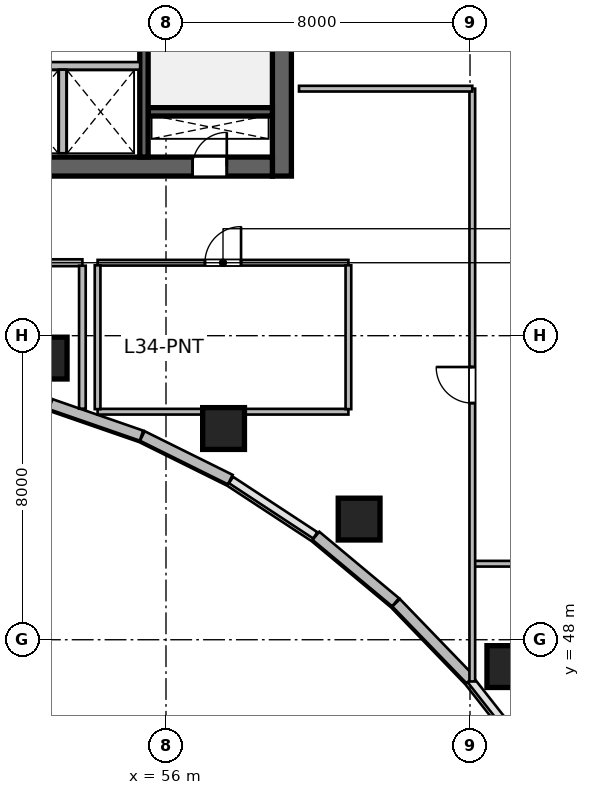
"""IFC4 building model, lengths in metres.
Left out: names, types, materials, properties, quantities, classifications, styles, units other than length and angle.
Written with IfcOpenShell. Run it as: python <this file> out.ifc"""

import sys

from ifc_helpers import new_model, si_unit, direction, frame, frame_2d, origin, origin_2d, place, context, subcontext, project, spatial, rectangle, circle, extrude, source, transform, mapped, element, fill, save


model = new_model("IFC4")
c1 = context("Model", 3, precision=1e-05, world=origin(), true_north=direction((0.0, 1.0)))
c2 = subcontext(c1, "Body", "Model", "MODEL_VIEW")
j1 = project(units=[si_unit("LENGTHUNIT", "METRE"), si_unit("PLANEANGLEUNIT", "RADIAN")], contexts=[c1])
p1 = place(None, origin())
s1 = spatial("IfcSite", under=j1, at=p1, CompositionType="ELEMENT")
p2 = place(p1, origin())
s2 = spatial("IfcBuilding", under=s1, at=p2, CompositionType="ELEMENT")
p3 = place(p2, frame((0.0, 0.0, 142.8)))
s3 = spatial("IfcBuildingStorey", under=s2, at=p3, CompositionType="ELEMENT", Elevation=142.8)
m1 = source(origin(), c2, "Body", "SweptSolid", [
    extrude(rectangle(XDim=12.0, YDim=0.5, at=frame_2d((6.0, 0.0))), origin(), (0.0, 0.0, 1.0), 3.9),
])
p4 = place(p3, frame((59.05, 60.2, 0.0), z_axis=(0.0, 0.0, 1.0), x_axis=(0.0, 1.0, 0.0)))
e1 = element("IfcWall", 1, at=p4, inside=s3, PredefinedType="SHEAR", context=c2, shape_type="MappedRepresentation", body=[
    mapped(m1, transform((0.0, 0.0, 0.0), scale=1.0)),
])
m2 = source(origin(), c2, "Body", "SweptSolid", [
    extrude(rectangle(XDim=21.6, YDim=0.5, at=frame_2d((10.8, 0.0))), origin(), (0.0, 0.0, 1.0), 3.9),
])
p5 = place(p3, frame((37.2, 60.45, 0.0), z_axis=(0.0, 0.0, 1.0), x_axis=(1.0, 0.0, 0.0)))
e2 = element("IfcWall", 2, at=p5, inside=s3, PredefinedType="SHEAR", context=c2, shape_type="MappedRepresentation", body=[
    mapped(m2, transform((0.0, 0.0, 0.0), scale=1.0)),
])
p6 = place(p5, frame((1.1, 0.0, 0.0)))
e3 = element("IfcOpeningElement", 3, at=p6, cuts=e2, PredefinedType="OPENING", context=c2, shape_type="SweptSolid", body=[
    extrude(rectangle(XDim=1.15, YDim=2.15, at=frame_2d((0.575, 1.075))), frame((0.0, 0.26, 0.0), z_axis=(0.0, -1.0, 0.0), x_axis=(1.0, 0.0, 0.0)), (0.0, 0.0, 1.0), 0.52),
])
p7 = place(p5, frame((19.5, 0.0, 0.0)))
e4 = element("IfcOpeningElement", 4, at=p7, cuts=e2, PredefinedType="OPENING", context=c2, shape_type="SweptSolid", body=[
    extrude(rectangle(XDim=0.9, YDim=2.1, at=frame_2d((0.45, 1.05))), frame((0.0, 0.26, 0.0), z_axis=(0.0, -1.0, 0.0), x_axis=(1.0, 0.0, 0.0)), (0.0, 0.0, 1.0), 0.52),
])
p8 = place(p5, frame((12.02, 0.0, 0.0)))
e5 = element("IfcOpeningElement", 5, at=p8, cuts=e2, PredefinedType="OPENING", context=c2, shape_type="SweptSolid", body=[
    extrude(rectangle(XDim=1.6, YDim=2.15, at=frame_2d((0.8, 1.075))), frame((0.0, 0.26, 0.0), z_axis=(0.0, -1.0, 0.0), x_axis=(1.0, 0.0, 0.0)), (0.0, 0.0, 1.0), 0.52),
])
m3 = source(origin(), c2, "Body", "SweptSolid", [
    extrude(rectangle(XDim=3.27, YDim=0.22, at=frame_2d((1.635, 0.0))), origin(), (0.0, 0.0, 1.0), 3.9),
])
p9 = place(p3, frame((55.53, 61.89, 0.0), z_axis=(0.0, 0.0, 1.0), x_axis=(1.0, 0.0, 0.0)))
e6 = element("IfcWall", 6, at=p9, inside=s3, PredefinedType="SHEAR", context=c2, shape_type="MappedRepresentation", body=[
    mapped(m3, transform((0.0, 0.0, 0.0), scale=1.0)),
])
m4 = source(origin(), c2, "Body", "SweptSolid", [
    extrude(rectangle(XDim=11.0, YDim=0.22, at=frame_2d((5.5, 0.0))), origin(), (0.0, 0.0, 1.0), 3.9),
])
p10 = place(p3, frame((55.42, 60.7, 0.0), z_axis=(0.0, 0.0, 1.0), x_axis=(0.0, 1.0, 0.0)))
e7 = element("IfcWall", 7, at=p10, inside=s3, PredefinedType="SHEAR", context=c2, shape_type="MappedRepresentation", body=[
    mapped(m4, transform((0.0, 0.0, 0.0), scale=1.0)),
])
p11 = place(p10, frame((9.545, 0.0, 0.0)))
e8 = element("IfcOpeningElement", 8, at=p11, cuts=e7, PredefinedType="OPENING", context=c2, shape_type="SweptSolid", body=[
    extrude(rectangle(XDim=1.15, YDim=2.15, at=frame_2d((0.575, 1.075))), frame((0.0, 0.12, 0.0), z_axis=(0.0, -1.0, 0.0), x_axis=(1.0, 0.0, 0.0)), (0.0, 0.0, 1.0), 0.24),
])
m5 = source(origin(), c2, "Body", "SweptSolid", [
    extrude(circle(Radius=0.55, at=origin_2d()), origin(), (0.0, 0.0, 1.0), 3.9),
])
for number, where, z_axis, x_axis in (
    (9, (52.846, 55.411, 0.0), (0.0, 0.0, 1.0), (0.143, 0.99, 0.0)),
    (10, (57.515, 53.558, 0.0), (0.0, 0.0, 1.0), (0.289, 0.957, 0.0)),
    (11, (61.082, 51.175, 0.0), (0.0, 0.0, 1.0), (0.409, 0.912, 0.0)),
    (12, (64.996, 47.294, 0.0), (0.0, 0.0, 1.0), (0.558, 0.83, 0.0)),
):
    element("IfcColumn", number, at=place(p3, frame(where, z_axis=z_axis, x_axis=x_axis)), inside=s3, PredefinedType="COLUMN", context=c2, shape_type="MappedRepresentation", body=[
        mapped(m5, transform((0.0, 0.0, 0.0), scale=1.0)),
    ])
m6 = source(origin(), c2, "Body", "SweptSolid", [
    extrude(rectangle(XDim=2.812, YDim=0.28, at=frame_2d((1.406, 0.0))), origin(), (0.0, 0.0, 1.0), 3.65),
])
p12 = place(p3, frame((64.008, 46.95, 0.0), z_axis=(0.0, 0.0, 1.0), x_axis=(-0.694583668785, 0.719411931411, 0.0)))
e13 = element("IfcWall", 13, at=p12, inside=s3, PredefinedType="SOLIDWALL", context=c2, shape_type="MappedRepresentation", body=[
    mapped(m6, transform((0.0, 0.0, 0.0), scale=1.0)),
])
m7 = source(origin(), c2, "Body", "SweptSolid", [
    extrude(rectangle(XDim=2.729, YDim=0.28, at=frame_2d((1.365, 0.0))), origin(), (0.0, 0.0, 1.0), 3.65),
])
p13 = place(p3, frame((62.041, 48.987, 0.0), z_axis=(0.0, 0.0, 1.0), x_axis=(-0.767957284255, 0.640501061326, 0.0)))
e14 = element("IfcWall", 14, at=p13, inside=s3, PredefinedType="SOLIDWALL", context=c2, shape_type="MappedRepresentation", body=[
    mapped(m7, transform((0.0, 0.0, 0.0), scale=1.0)),
])
m8 = source(origin(), c2, "Body", "SweptSolid", [
    extrude(rectangle(XDim=2.584, YDim=0.28, at=frame_2d((1.292, 0.0))), origin(), (0.0, 0.0, 1.0), 3.65),
])
p14 = place(p3, frame((57.692, 52.213, 0.0), z_axis=(0.0, 0.0, 1.0), x_axis=(-0.895989792847, 0.44407464588, 0.0)))
e15 = element("IfcWall", 15, at=p14, inside=s3, PredefinedType="SOLIDWALL", context=c2, shape_type="MappedRepresentation", body=[
    mapped(m8, transform((0.0, 0.0, 0.0), scale=1.0)),
])
m9 = source(origin(), c2, "Body", "SweptSolid", [
    extrude(rectangle(XDim=2.53, YDim=0.28, at=frame_2d((1.265, 0.0))), origin(), (0.0, 0.0, 1.0), 3.65),
])
p15 = place(p3, frame((55.355, 53.37, 0.0), z_axis=(0.0, 0.0, 1.0), x_axis=(-0.944872429646, 0.327438683872, 0.0)))
e16 = element("IfcWall", 16, at=p15, inside=s3, PredefinedType="SOLIDWALL", context=c2, shape_type="MappedRepresentation", body=[
    mapped(m9, transform((0.0, 0.0, 0.0), scale=1.0)),
])
m10 = source(origin(), c2, "Body", "SweptSolid", [
    extrude(rectangle(XDim=4.1, YDim=0.2, at=frame_2d((2.05, 0.0))), origin(), (0.0, 0.0, 1.0), 3.65),
])
p16 = place(p3, frame((51.22, 63.1, 0.0), z_axis=(0.0, 0.0, 1.0), x_axis=(1.0, 0.0, 0.0)))
e17 = element("IfcWall", 17, at=p16, inside=s3, PredefinedType="SOLIDWALL", context=c2, shape_type="MappedRepresentation", body=[
    mapped(m10, transform((0.0, 0.0, 0.0), scale=1.0)),
])
m11 = source(origin(), c2, "Body", "SweptSolid", [
    extrude(rectangle(XDim=2.2, YDim=0.2, at=frame_2d((1.1, 0.0))), origin(), (0.0, 0.0, 1.0), 3.65),
])
p17 = place(p3, frame((53.28, 60.8, 0.0), z_axis=(0.0, 0.0, 1.0), x_axis=(0.0, 1.0, 0.0)))
e18 = element("IfcWall", 18, at=p17, inside=s3, PredefinedType="SOLIDWALL", context=c2, shape_type="MappedRepresentation", body=[
    mapped(m11, transform((0.0, 0.0, 0.0), scale=1.0)),
])
m12 = source(origin(), c2, "Body", "SweptSolid", [
    extrude(rectangle(XDim=3.248, YDim=0.18, at=frame_2d((1.624, 0.0))), origin(), (0.0, 0.0, 1.0), 3.65),
])
p18 = place(p3, frame((50.552, 57.92, 0.0), z_axis=(0.0, 0.0, 1.0), x_axis=(1.0, 0.0, 0.0)))
e19 = element("IfcWall", 19, at=p18, inside=s3, PredefinedType="PLUMBINGWALL", context=c2, shape_type="MappedRepresentation", body=[
    mapped(m12, transform((0.0, 0.0, 0.0), scale=1.0)),
])
p19 = place(p18, frame((1.149, 0.0, 0.0)))
e20 = element("IfcOpeningElement", 20, at=p19, cuts=e19, PredefinedType="OPENING", context=c2, shape_type="SweptSolid", body=[
    extrude(rectangle(XDim=0.95, YDim=2.12, at=frame_2d((0.475, 1.06))), frame((0.0, 0.1, 0.0), z_axis=(0.0, -1.0, 0.0), x_axis=(1.0, 0.0, 0.0)), (0.0, 0.0, 1.0), 0.2),
])
m13 = source(origin(), c2, "Body", "SweptSolid", [
    extrude(rectangle(XDim=3.763, YDim=0.175, at=frame_2d((1.881, 0.0))), origin(), (0.0, 0.0, 1.0), 3.65),
])
p20 = place(p3, frame((53.8, 54.079, 0.0), z_axis=(0.0, 0.0, 1.0), x_axis=(0.0, 1.0, 0.0)))
e21 = element("IfcWall", 21, at=p20, inside=s3, PredefinedType="PARTITIONING", context=c2, shape_type="MappedRepresentation", body=[
    mapped(m13, transform((0.0, 0.0, 0.0), scale=1.0)),
])
m14 = source(origin(), c2, "Body", "SweptSolid", [
    extrude(rectangle(XDim=6.6, YDim=0.15, at=frame_2d((3.3, 0.0))), origin(), (0.0, 0.0, 1.0), 3.095),
])
p21 = place(p3, frame((54.2, 54.0, 0.0), z_axis=(0.0, 0.0, 1.0), x_axis=(1.0, 0.0, 0.0)))
e22 = element("IfcWall", 22, at=p21, inside=s3, PredefinedType="PARTITIONING", context=c2, shape_type="MappedRepresentation", body=[
    mapped(m14, transform((0.0, 0.0, 0.0), scale=1.0)),
])
m15 = source(origin(), c2, "Body", "SweptSolid", [
    extrude(rectangle(XDim=6.6, YDim=0.15, at=frame_2d((3.3, 0.0))), origin(), (0.0, 0.0, 1.0), 3.65),
])
p22 = place(p3, frame((54.2, 57.92, 0.0), z_axis=(0.0, 0.0, 1.0), x_axis=(1.0, 0.0, 0.0)))
e23 = element("IfcWall", 23, at=p22, inside=s3, PredefinedType="PARTITIONING", context=c2, shape_type="MappedRepresentation", body=[
    mapped(m15, transform((0.0, 0.0, 0.0), scale=1.0)),
])
p23 = place(p22, frame((2.825, 0.0, 0.0)))
e24 = element("IfcOpeningElement", 24, at=p23, cuts=e23, PredefinedType="OPENING", context=c2, shape_type="SweptSolid", body=[
    extrude(rectangle(XDim=0.95, YDim=2.1, at=frame_2d((0.475, 1.05))), frame((0.0, 0.085, 0.0), z_axis=(0.0, -1.0, 0.0), x_axis=(1.0, 0.0, 0.0)), (0.0, 0.0, 1.0), 0.17),
])
m16 = source(origin(), c2, "Body", "SweptSolid", [
    extrude(rectangle(XDim=3.785, YDim=0.15, at=frame_2d((1.893, 0.0))), origin(), (0.0, 0.0, 1.0), 3.65),
])
for number, where, z_axis, x_axis in (
    (25, (54.2, 54.067, 0.0), (0.0, 0.0, 1.0), (0.0, 1.0, 0.0)),
    (26, (60.8, 54.067, 0.0), (0.0, 0.0, 1.0), (0.0, 1.0, 0.0)),
):
    element("IfcWall", number, at=place(p3, frame(where, z_axis=z_axis, x_axis=x_axis)), inside=s3, PredefinedType="PARTITIONING", context=c2, shape_type="MappedRepresentation", body=[
        mapped(m16, transform((0.0, 0.0, 0.0), scale=1.0)),
    ])
m17 = source(origin(), c2, "Body", "SweptSolid", [
    extrude(rectangle(XDim=2.5, YDim=0.15, at=frame_2d((1.25, 0.0))), origin(), (0.0, 0.0, 1.0), 3.65),
])
p24 = place(p3, frame((64.1, 50.0, 0.0), z_axis=(0.0, 0.0, 1.0), x_axis=(1.0, 0.0, 0.0)))
e27 = element("IfcWall", 27, at=p24, inside=s3, PredefinedType="PARTITIONING", context=c2, shape_type="MappedRepresentation", body=[
    mapped(m17, transform((0.0, 0.0, 0.0), scale=1.0)),
])
m18 = source(origin(), c2, "Body", "SweptSolid", [
    extrude(rectangle(XDim=15.598, YDim=0.15, at=frame_2d((7.799, 0.0))), origin(), (0.0, 0.0, 1.0), 2.942),
])
p25 = place(p3, frame((64.06, 46.902, 0.0), z_axis=(0.0, 0.0, 1.0), x_axis=(0.0, 1.0, 0.0)))
e28 = element("IfcWall", 28, at=p25, inside=s3, PredefinedType="PARTITIONING", context=c2, shape_type="MappedRepresentation", body=[
    mapped(m18, transform((0.0, 0.0, 0.0), scale=1.0)),
])
p26 = place(p25, frame((7.324, 0.0, 0.0)))
e29 = element("IfcOpeningElement", 29, at=p26, cuts=e28, PredefinedType="OPENING", context=c2, shape_type="SweptSolid", body=[
    extrude(rectangle(XDim=0.95, YDim=2.1, at=frame_2d((0.475, 1.05))), frame((0.0, 0.085, 0.0), z_axis=(0.0, -1.0, 0.0), x_axis=(1.0, 0.0, 0.0)), (0.0, 0.0, 1.0), 0.17),
])
m19 = source(origin(), c2, "Body", "SweptSolid", [
    extrude(rectangle(XDim=4.56, YDim=0.15, at=frame_2d((2.28, 0.0))), origin(), (0.0, 0.0, 1.0), 3.65),
])
p27 = place(p3, frame((59.5, 62.5, 0.0), z_axis=(0.0, 0.0, 1.0), x_axis=(1.0, 0.0, 0.0)))
e30 = element("IfcWall", 30, at=p27, inside=s3, PredefinedType="PARTITIONING", context=c2, shape_type="MappedRepresentation", body=[
    mapped(m19, transform((0.0, 0.0, 0.0), scale=1.0)),
])
m20 = source(origin(), c2, "Body", "SweptSolid", [
    extrude(rectangle(XDim=0.9, YDim=2.1, at=frame_2d((0.45, 1.05))), frame((0.0, 0.025, 0.0), z_axis=(0.0, -1.0, 0.0), x_axis=(1.0, 0.0, 0.0)), (0.0, 0.0, 1.0), 0.05),
])
p28 = place(p7, origin())
e31 = element("IfcDoor", 31, at=p28, inside=s3, OperationType="SINGLE_SWING_RIGHT", PredefinedType="DOOR", context=c2, shape_type="MappedRepresentation", body=[
    mapped(m20, transform((0.0, 0.0, 0.0), scale=1.0)),
])
fill(e4, e31)
m21 = source(origin(), c2, "Body", "SweptSolid", [
    extrude(rectangle(XDim=0.95, YDim=2.1, at=frame_2d((0.475, 1.05))), frame((0.0, 0.025, 0.0), z_axis=(0.0, -1.0, 0.0), x_axis=(1.0, 0.0, 0.0)), (0.0, 0.0, 1.0), 0.05),
])
p29 = place(p23, origin())
e32 = element("IfcDoor", 32, at=p29, inside=s3, OperationType="SINGLE_SWING_RIGHT", PredefinedType="DOOR", context=c2, shape_type="MappedRepresentation", body=[
    mapped(m21, transform((0.0, 0.0, 0.0), scale=1.0)),
])
fill(e24, e32)
p30 = place(p26, origin())
e33 = element("IfcDoor", 33, at=p30, inside=s3, OperationType="SINGLE_SWING_RIGHT", PredefinedType="DOOR", context=c2, shape_type="MappedRepresentation", body=[
    mapped(m21, transform((0.0, 0.0, 0.0), scale=1.0)),
])
fill(e29, e33)
save(model, sys.argv[1])
